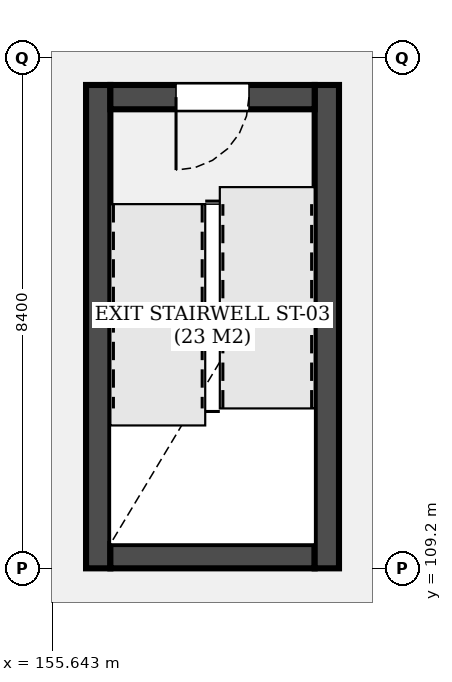
"""IFC4 building model, lengths in metres.
Left out: names, types, materials, properties, quantities, classifications, styles, units other than length and angle.
Written with IfcOpenShell. Run it as: python <this file> out.ifc"""

import sys

from ifc_helpers import new_model, si_unit, direction, frame, frame_2d, origin, place, context, subcontext, project, spatial, rectangle, extrude, element, fill, save


model = new_model("IFC4")
c1 = context("Model", 3, precision=1e-05, world=origin(), true_north=direction((0.0, 1.0)))
c2 = subcontext(c1, "Body", "Model", "MODEL_VIEW")
j1 = project(units=[si_unit("LENGTHUNIT", "METRE"), si_unit("PLANEANGLEUNIT", "RADIAN")], contexts=[c1])
p1 = place(None, origin())
s1 = spatial("IfcSite", under=j1, at=p1, CompositionType="ELEMENT")
p2 = place(p1, origin())
s2 = spatial("IfcBuilding", under=s1, at=p2, CompositionType="ELEMENT")
p3 = place(p2, frame((0.0, 0.0, 5.1)))
s3 = spatial("IfcBuildingStorey", under=s2, at=p3, CompositionType="ELEMENT", Elevation=5.1)
p4 = place(p3, frame((156.4, 117.15, 0.0), z_axis=(0.0, 0.0, 1.0), x_axis=(0.0, -1.0, 0.0)))
e1 = element("IfcWall", 1, at=p4, inside=s3, PredefinedType="SHEAR", context=c2, shape_type="SweptSolid", body=[
    extrude(rectangle(XDim=7.95, YDim=0.4, at=frame_2d((3.975, 0.0))), origin(), (0.0, 0.0, 1.0), 4.8),
])
p5 = place(p3, frame((156.6, 109.4, 0.0), z_axis=(0.0, 0.0, 1.0), x_axis=(1.0, 0.0, 0.0)))
e2 = element("IfcWall", 2, at=p5, inside=s3, PredefinedType="SHEAR", context=c2, shape_type="SweptSolid", body=[
    extrude(rectangle(XDim=3.36, YDim=0.4, at=frame_2d((1.68, 0.0))), origin(), (0.0, 0.0, 1.0), 4.8),
])
p6 = place(p3, frame((160.16, 109.2, 0.0), z_axis=(0.0, 0.0, 1.0), x_axis=(0.0, 1.0, 0.0)))
e3 = element("IfcWall", 3, at=p6, inside=s3, PredefinedType="SHEAR", context=c2, shape_type="SweptSolid", body=[
    extrude(rectangle(XDim=7.95, YDim=0.4, at=frame_2d((3.975, 0.0))), origin(), (0.0, 0.0, 1.0), 4.8),
])
p7 = place(p3, frame((159.96, 116.95, 0.0), z_axis=(0.0, 0.0, 1.0), x_axis=(-1.0, 0.0, 0.0)))
e4 = element("IfcWall", 4, at=p7, inside=s3, PredefinedType="SHEAR", context=c2, shape_type="SweptSolid", body=[
    extrude(rectangle(XDim=3.36, YDim=0.4, at=frame_2d((1.68, 0.0))), origin(), (0.0, 0.0, 1.0), 4.8),
])
p8 = place(p7, frame((1.08, 0.0, 0.0)))
e5 = element("IfcOpeningElement", 5, at=p8, cuts=e4, PredefinedType="OPENING", context=c2, shape_type="SweptSolid", body=[
    extrude(rectangle(XDim=1.2, YDim=2.2, at=frame_2d((0.6, 1.1))), frame((0.0, 0.21, 0.0), z_axis=(0.0, -1.0, 0.0), x_axis=(1.0, 0.0, 0.0)), (0.0, 0.0, 1.0), 0.42),
])
p9 = place(p8, origin())
e6 = element("IfcDoor", 6, at=p9, inside=s3, OperationType="SINGLE_SWING_RIGHT", PredefinedType="DOOR", context=c2, shape_type="SweptSolid", body=[
    extrude(rectangle(XDim=1.2, YDim=2.2, at=frame_2d((0.6, 1.1))), frame((0.0, 0.025, 0.0), z_axis=(0.0, -1.0, 0.0), x_axis=(1.0, 0.0, 0.0)), (0.0, 0.0, 1.0), 0.05),
])
fill(e5, e6)
save(model, sys.argv[1])
